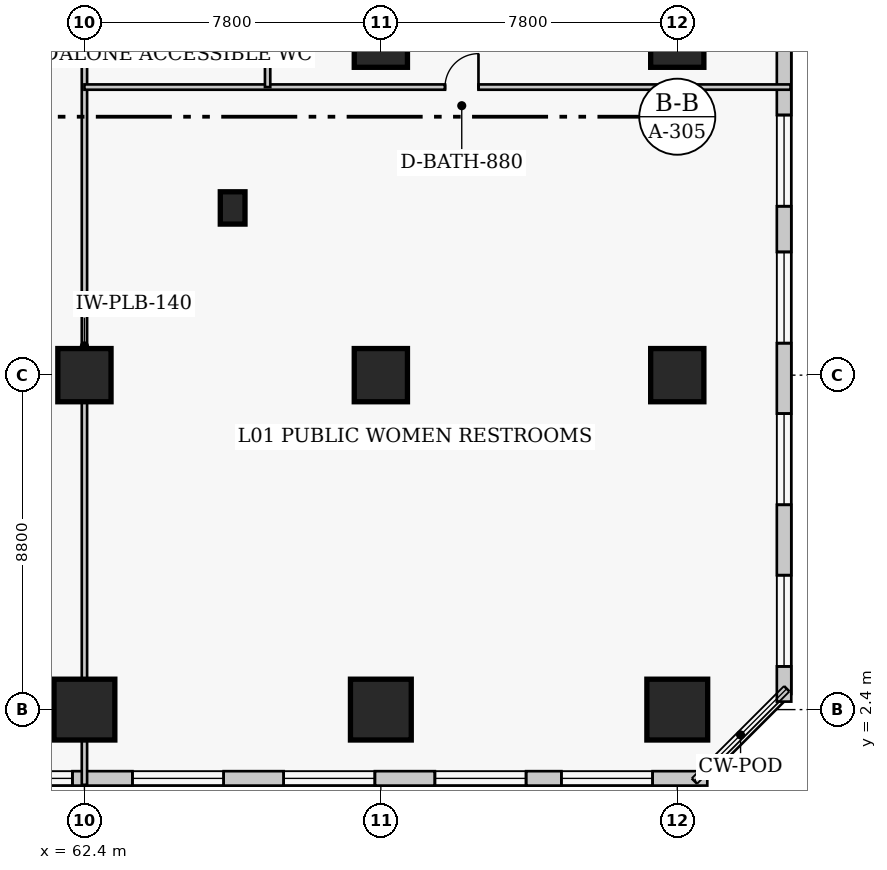
"""IFC4 building model, lengths in metres.
Left out: names, types, materials, properties, quantities, classifications, styles, units other than length and angle.
Written with IfcOpenShell. Run it as: python <this file> out.ifc"""

import sys

from ifc_helpers import new_model, si_unit, direction, frame, frame_2d, origin, origin_2d, place, context, subcontext, project, spatial, rectangle, extrude, element, fill, save


model = new_model("IFC4")
c1 = context("Model", 3, precision=1e-05, world=origin(), true_north=direction((0.0, 1.0)))
c2 = subcontext(c1, "Body", "Model", "MODEL_VIEW")
j1 = project(units=[si_unit("LENGTHUNIT", "METRE"), si_unit("PLANEANGLEUNIT", "RADIAN")], contexts=[c1])
p1 = place(None, origin())
s1 = spatial("IfcSite", under=j1, at=p1, CompositionType="ELEMENT")
p2 = place(p1, origin())
s2 = spatial("IfcBuilding", under=s1, at=p2, CompositionType="ELEMENT")
p3 = place(p2, frame((0.0, 0.0, 5.4)))
s3 = spatial("IfcBuildingStorey", under=s2, at=p3, CompositionType="ELEMENT", Elevation=5.4)
p4 = place(p3, frame((62.4, 2.4, 0.0), z_axis=(0.0, 0.0, 1.0), x_axis=(1.0, 0.0, 0.0)))
e1 = element("IfcColumn", 1, at=p4, inside=s3, PredefinedType="COLUMN", context=c2, shape_type="SweptSolid", body=[
    extrude(rectangle(XDim=1.6, YDim=1.6, at=origin_2d()), origin(), (0.0, 0.0, 1.0), 5.0),
])
p5 = place(p3, frame((62.4, 11.2, 0.0), z_axis=(0.0, 0.0, 1.0), x_axis=(1.0, 0.0, 0.0)))
e2 = element("IfcColumn", 2, at=p5, inside=s3, PredefinedType="COLUMN", context=c2, shape_type="SweptSolid", body=[
    extrude(rectangle(XDim=1.4, YDim=1.4, at=origin_2d()), origin(), (0.0, 0.0, 1.0), 5.0),
])
p6 = place(p3, frame((70.2, 2.4, 0.0), z_axis=(0.0, 0.0, 1.0), x_axis=(1.0, 0.0, 0.0)))
e3 = element("IfcColumn", 3, at=p6, inside=s3, PredefinedType="COLUMN", context=c2, shape_type="SweptSolid", body=[
    extrude(rectangle(XDim=1.6, YDim=1.6, at=origin_2d()), origin(), (0.0, 0.0, 1.0), 5.0),
])
for number, where, z_axis, x_axis in (
    (4, (70.2, 11.2, 0.0), (0.0, 0.0, 1.0), (1.0, 0.0, 0.0)),
    (5, (70.2, 20.0, 0.0), (0.0, 0.0, 1.0), (1.0, 0.0, 0.0)),
):
    element("IfcColumn", number, at=place(p3, frame(where, z_axis=z_axis, x_axis=x_axis)), inside=s3, PredefinedType="COLUMN", context=c2, shape_type="SweptSolid", body=[
        extrude(rectangle(XDim=1.4, YDim=1.4, at=origin_2d()), origin(), (0.0, 0.0, 1.0), 5.0),
    ])
p7 = place(p3, frame((78.0, 2.4, 0.0), z_axis=(0.0, 0.0, 1.0), x_axis=(1.0, 0.0, 0.0)))
e6 = element("IfcColumn", 6, at=p7, inside=s3, PredefinedType="COLUMN", context=c2, shape_type="SweptSolid", body=[
    extrude(rectangle(XDim=1.6, YDim=1.6, at=origin_2d()), origin(), (0.0, 0.0, 1.0), 5.0),
])
for number, where, z_axis, x_axis in (
    (7, (78.0, 11.2, 0.0), (0.0, 0.0, 1.0), (1.0, 0.0, 0.0)),
    (8, (78.0, 20.0, 0.0), (0.0, 0.0, 1.0), (1.0, 0.0, 0.0)),
):
    element("IfcColumn", number, at=place(p3, frame(where, z_axis=z_axis, x_axis=x_axis)), inside=s3, PredefinedType="COLUMN", context=c2, shape_type="SweptSolid", body=[
        extrude(rectangle(XDim=1.4, YDim=1.4, at=origin_2d()), origin(), (0.0, 0.0, 1.0), 5.0),
    ])
p8 = place(p3, frame((66.3, 15.6, 0.0), z_axis=(0.0, 0.0, 1.0), x_axis=(1.0, 0.0, 0.0)))
e9 = element("IfcColumn", 9, at=p8, inside=s3, PredefinedType="PILASTER", context=c2, shape_type="SweptSolid", body=[
    extrude(rectangle(XDim=0.65, YDim=0.85, at=origin_2d()), origin(), (0.0, 0.0, 1.0), 5.0),
])
p9 = place(p3, frame((-0.79, 0.59, 0.0), z_axis=(0.0, 0.0, 1.0), x_axis=(1.0, 0.0, 0.0)))
e10 = element("IfcWall", 10, at=p9, inside=s3, PredefinedType="SOLIDWALL", context=c2, shape_type="SweptSolid", body=[
    extrude(rectangle(XDim=79.58, YDim=0.38, at=frame_2d((39.79, 0.0))), origin(), (0.0, 0.0, 1.0), 4.65),
])
p10 = place(p9, frame((1.439, 0.0, 0.75)))
e11 = element("IfcOpeningElement", 11, at=p10, cuts=e10, PredefinedType="OPENING", context=c2, shape_type="SweptSolid", body=[
    extrude(rectangle(XDim=2.4, YDim=2.2, at=frame_2d((1.2, 1.1))), frame((0.0, 0.2, 0.0), z_axis=(0.0, -1.0, 0.0), x_axis=(1.0, 0.0, 0.0)), (0.0, 0.0, 1.0), 0.4),
])
p11 = place(p9, frame((4.769, 0.0, 0.75)))
e12 = element("IfcOpeningElement", 12, at=p11, cuts=e10, PredefinedType="OPENING", context=c2, shape_type="SweptSolid", body=[
    extrude(rectangle(XDim=2.4, YDim=2.2, at=frame_2d((1.2, 1.1))), frame((0.0, 0.2, 0.0), z_axis=(0.0, -1.0, 0.0), x_axis=(1.0, 0.0, 0.0)), (0.0, 0.0, 1.0), 0.4),
])
p12 = place(p9, frame((16.706, 0.0, 0.75)))
e13 = element("IfcOpeningElement", 13, at=p12, cuts=e10, PredefinedType="OPENING", context=c2, shape_type="SweptSolid", body=[
    extrude(rectangle(XDim=2.4, YDim=2.2, at=frame_2d((1.2, 1.1))), frame((0.0, 0.2, 0.0), z_axis=(0.0, -1.0, 0.0), x_axis=(1.0, 0.0, 0.0)), (0.0, 0.0, 1.0), 0.4),
])
p13 = place(p9, frame((20.685, 0.0, 0.75)))
e14 = element("IfcOpeningElement", 14, at=p13, cuts=e10, PredefinedType="OPENING", context=c2, shape_type="SweptSolid", body=[
    extrude(rectangle(XDim=2.4, YDim=2.2, at=frame_2d((1.2, 1.1))), frame((0.0, 0.2, 0.0), z_axis=(0.0, -1.0, 0.0), x_axis=(1.0, 0.0, 0.0)), (0.0, 0.0, 1.0), 0.4),
])
p14 = place(p9, frame((24.664, 0.0, 0.75)))
e15 = element("IfcOpeningElement", 15, at=p14, cuts=e10, PredefinedType="OPENING", context=c2, shape_type="SweptSolid", body=[
    extrude(rectangle(XDim=2.4, YDim=2.2, at=frame_2d((1.2, 1.1))), frame((0.0, 0.2, 0.0), z_axis=(0.0, -1.0, 0.0), x_axis=(1.0, 0.0, 0.0)), (0.0, 0.0, 1.0), 0.4),
])
p15 = place(p9, frame((28.643, 0.0, 0.75)))
e16 = element("IfcOpeningElement", 16, at=p15, cuts=e10, PredefinedType="OPENING", context=c2, shape_type="SweptSolid", body=[
    extrude(rectangle(XDim=2.4, YDim=2.2, at=frame_2d((1.2, 1.1))), frame((0.0, 0.2, 0.0), z_axis=(0.0, -1.0, 0.0), x_axis=(1.0, 0.0, 0.0)), (0.0, 0.0, 1.0), 0.4),
])
p16 = place(p9, frame((31.971, 0.0, 0.75)))
e17 = element("IfcOpeningElement", 17, at=p16, cuts=e10, PredefinedType="OPENING", context=c2, shape_type="SweptSolid", body=[
    extrude(rectangle(XDim=2.4, YDim=2.2, at=frame_2d((1.2, 1.1))), frame((0.0, 0.2, 0.0), z_axis=(0.0, -1.0, 0.0), x_axis=(1.0, 0.0, 0.0)), (0.0, 0.0, 1.0), 0.4),
])
p17 = place(p9, frame((37.75, 0.0, 0.75)))
e18 = element("IfcOpeningElement", 18, at=p17, cuts=e10, PredefinedType="OPENING", context=c2, shape_type="SweptSolid", body=[
    extrude(rectangle(XDim=2.4, YDim=2.2, at=frame_2d((1.2, 1.1))), frame((0.0, 0.2, 0.0), z_axis=(0.0, -1.0, 0.0), x_axis=(1.0, 0.0, 0.0)), (0.0, 0.0, 1.0), 0.4),
])
p18 = place(p9, frame((44.559, 0.0, 0.75)))
e19 = element("IfcOpeningElement", 19, at=p18, cuts=e10, PredefinedType="OPENING", context=c2, shape_type="SweptSolid", body=[
    extrude(rectangle(XDim=2.4, YDim=2.2, at=frame_2d((1.2, 1.1))), frame((0.0, 0.2, 0.0), z_axis=(0.0, -1.0, 0.0), x_axis=(1.0, 0.0, 0.0)), (0.0, 0.0, 1.0), 0.4),
])
p19 = place(p9, frame((49.188, 0.0, 0.75)))
e20 = element("IfcOpeningElement", 20, at=p19, cuts=e10, PredefinedType="OPENING", context=c2, shape_type="SweptSolid", body=[
    extrude(rectangle(XDim=2.4, YDim=2.2, at=frame_2d((1.2, 1.1))), frame((0.0, 0.2, 0.0), z_axis=(0.0, -1.0, 0.0), x_axis=(1.0, 0.0, 0.0)), (0.0, 0.0, 1.0), 0.4),
])
p20 = place(p9, frame((52.517, 0.0, 0.75)))
e21 = element("IfcOpeningElement", 21, at=p20, cuts=e10, PredefinedType="OPENING", context=c2, shape_type="SweptSolid", body=[
    extrude(rectangle(XDim=2.4, YDim=2.2, at=frame_2d((1.2, 1.1))), frame((0.0, 0.2, 0.0), z_axis=(0.0, -1.0, 0.0), x_axis=(1.0, 0.0, 0.0)), (0.0, 0.0, 1.0), 0.4),
])
p21 = place(p9, frame((56.496, 0.0, 0.75)))
e22 = element("IfcOpeningElement", 22, at=p21, cuts=e10, PredefinedType="OPENING", context=c2, shape_type="SweptSolid", body=[
    extrude(rectangle(XDim=2.4, YDim=2.2, at=frame_2d((1.2, 1.1))), frame((0.0, 0.2, 0.0), z_axis=(0.0, -1.0, 0.0), x_axis=(1.0, 0.0, 0.0)), (0.0, 0.0, 1.0), 0.4),
])
p22 = place(p9, frame((60.475, 0.0, 0.75)))
e23 = element("IfcOpeningElement", 23, at=p22, cuts=e10, PredefinedType="OPENING", context=c2, shape_type="SweptSolid", body=[
    extrude(rectangle(XDim=2.4, YDim=2.2, at=frame_2d((1.2, 1.1))), frame((0.0, 0.2, 0.0), z_axis=(0.0, -1.0, 0.0), x_axis=(1.0, 0.0, 0.0)), (0.0, 0.0, 1.0), 0.4),
])
p23 = place(p9, frame((64.454, 0.0, 0.75)))
e24 = element("IfcOpeningElement", 24, at=p23, cuts=e10, PredefinedType="OPENING", context=c2, shape_type="SweptSolid", body=[
    extrude(rectangle(XDim=2.4, YDim=2.2, at=frame_2d((1.2, 1.1))), frame((0.0, 0.2, 0.0), z_axis=(0.0, -1.0, 0.0), x_axis=(1.0, 0.0, 0.0)), (0.0, 0.0, 1.0), 0.4),
])
p24 = place(p9, frame((68.433, 0.0, 0.75)))
e25 = element("IfcOpeningElement", 25, at=p24, cuts=e10, PredefinedType="OPENING", context=c2, shape_type="SweptSolid", body=[
    extrude(rectangle(XDim=2.4, YDim=2.2, at=frame_2d((1.2, 1.1))), frame((0.0, 0.2, 0.0), z_axis=(0.0, -1.0, 0.0), x_axis=(1.0, 0.0, 0.0)), (0.0, 0.0, 1.0), 0.4),
])
p25 = place(p9, frame((72.412, 0.0, 0.75)))
e26 = element("IfcOpeningElement", 26, at=p25, cuts=e10, PredefinedType="OPENING", context=c2, shape_type="SweptSolid", body=[
    extrude(rectangle(XDim=2.4, YDim=2.2, at=frame_2d((1.2, 1.1))), frame((0.0, 0.2, 0.0), z_axis=(0.0, -1.0, 0.0), x_axis=(1.0, 0.0, 0.0)), (0.0, 0.0, 1.0), 0.4),
])
p26 = place(p9, frame((75.74, 0.0, 0.75)))
e27 = element("IfcOpeningElement", 27, at=p26, cuts=e10, PredefinedType="OPENING", context=c2, shape_type="SweptSolid", body=[
    extrude(rectangle(XDim=2.4, YDim=2.2, at=frame_2d((1.2, 1.1))), frame((0.0, 0.2, 0.0), z_axis=(0.0, -1.0, 0.0), x_axis=(1.0, 0.0, 0.0)), (0.0, 0.0, 1.0), 0.4),
])
p27 = place(p3, frame((80.81, 2.61, 0.0), z_axis=(0.0, 0.0, 1.0), x_axis=(0.0, 1.0, 0.0)))
e28 = element("IfcWall", 28, at=p27, inside=s3, PredefinedType="SOLIDWALL", context=c2, shape_type="SweptSolid", body=[
    extrude(rectangle(XDim=46.78, YDim=0.38, at=frame_2d((23.39, 0.0))), origin(), (0.0, 0.0, 1.0), 4.65),
])
p28 = place(p27, frame((0.927, 0.0, 0.75)))
e29 = element("IfcOpeningElement", 29, at=p28, cuts=e28, PredefinedType="OPENING", context=c2, shape_type="SweptSolid", body=[
    extrude(rectangle(XDim=2.4, YDim=2.2, at=frame_2d((1.2, 1.1))), frame((0.0, 0.2, 0.0), z_axis=(0.0, -1.0, 0.0), x_axis=(1.0, 0.0, 0.0)), (0.0, 0.0, 1.0), 0.4),
])
p29 = place(p27, frame((5.179, 0.0, 0.75)))
e30 = element("IfcOpeningElement", 30, at=p29, cuts=e28, PredefinedType="OPENING", context=c2, shape_type="SweptSolid", body=[
    extrude(rectangle(XDim=2.4, YDim=2.2, at=frame_2d((1.2, 1.1))), frame((0.0, 0.2, 0.0), z_axis=(0.0, -1.0, 0.0), x_axis=(1.0, 0.0, 0.0)), (0.0, 0.0, 1.0), 0.4),
])
p30 = place(p27, frame((9.432, 0.0, 0.75)))
e31 = element("IfcOpeningElement", 31, at=p30, cuts=e28, PredefinedType="OPENING", context=c2, shape_type="SweptSolid", body=[
    extrude(rectangle(XDim=2.4, YDim=2.2, at=frame_2d((1.2, 1.1))), frame((0.0, 0.2, 0.0), z_axis=(0.0, -1.0, 0.0), x_axis=(1.0, 0.0, 0.0)), (0.0, 0.0, 1.0), 0.4),
])
p31 = place(p27, frame((13.034, 0.0, 0.75)))
e32 = element("IfcOpeningElement", 32, at=p31, cuts=e28, PredefinedType="OPENING", context=c2, shape_type="SweptSolid", body=[
    extrude(rectangle(XDim=2.4, YDim=2.2, at=frame_2d((1.2, 1.1))), frame((0.0, 0.2, 0.0), z_axis=(0.0, -1.0, 0.0), x_axis=(1.0, 0.0, 0.0)), (0.0, 0.0, 1.0), 0.4),
])
p32 = place(p27, frame((17.937, 0.0, 0.75)))
e33 = element("IfcOpeningElement", 33, at=p32, cuts=e28, PredefinedType="OPENING", context=c2, shape_type="SweptSolid", body=[
    extrude(rectangle(XDim=2.4, YDim=2.2, at=frame_2d((1.2, 1.1))), frame((0.0, 0.2, 0.0), z_axis=(0.0, -1.0, 0.0), x_axis=(1.0, 0.0, 0.0)), (0.0, 0.0, 1.0), 0.4),
])
p33 = place(p27, frame((26.443, 0.0, 0.75)))
e34 = element("IfcOpeningElement", 34, at=p33, cuts=e28, PredefinedType="OPENING", context=c2, shape_type="SweptSolid", body=[
    extrude(rectangle(XDim=2.4, YDim=2.2, at=frame_2d((1.2, 1.1))), frame((0.0, 0.2, 0.0), z_axis=(0.0, -1.0, 0.0), x_axis=(1.0, 0.0, 0.0)), (0.0, 0.0, 1.0), 0.4),
])
p34 = place(p27, frame((30.696, 0.0, 0.75)))
e35 = element("IfcOpeningElement", 35, at=p34, cuts=e28, PredefinedType="OPENING", context=c2, shape_type="SweptSolid", body=[
    extrude(rectangle(XDim=2.4, YDim=2.2, at=frame_2d((1.2, 1.1))), frame((0.0, 0.2, 0.0), z_axis=(0.0, -1.0, 0.0), x_axis=(1.0, 0.0, 0.0)), (0.0, 0.0, 1.0), 0.4),
])
p35 = place(p27, frame((34.948, 0.0, 0.75)))
e36 = element("IfcOpeningElement", 36, at=p35, cuts=e28, PredefinedType="OPENING", context=c2, shape_type="SweptSolid", body=[
    extrude(rectangle(XDim=2.4, YDim=2.2, at=frame_2d((1.2, 1.1))), frame((0.0, 0.2, 0.0), z_axis=(0.0, -1.0, 0.0), x_axis=(1.0, 0.0, 0.0)), (0.0, 0.0, 1.0), 0.4),
])
p36 = place(p27, frame((39.201, 0.0, 0.75)))
e37 = element("IfcOpeningElement", 37, at=p36, cuts=e28, PredefinedType="OPENING", context=c2, shape_type="SweptSolid", body=[
    extrude(rectangle(XDim=2.4, YDim=2.2, at=frame_2d((1.2, 1.1))), frame((0.0, 0.2, 0.0), z_axis=(0.0, -1.0, 0.0), x_axis=(1.0, 0.0, 0.0)), (0.0, 0.0, 1.0), 0.4),
])
p37 = place(p27, frame((43.454, 0.0, 0.75)))
e38 = element("IfcOpeningElement", 38, at=p37, cuts=e28, PredefinedType="OPENING", context=c2, shape_type="SweptSolid", body=[
    extrude(rectangle(XDim=2.4, YDim=2.2, at=frame_2d((1.2, 1.1))), frame((0.0, 0.2, 0.0), z_axis=(0.0, -1.0, 0.0), x_axis=(1.0, 0.0, 0.0)), (0.0, 0.0, 1.0), 0.4),
])
p38 = place(p3, frame((62.4, 0.42, 0.0), z_axis=(0.0, 0.0, 1.0), x_axis=(0.0, 1.0, 0.0)))
e39 = element("IfcWall", 39, at=p38, inside=s3, PredefinedType="PLUMBINGWALL", context=c2, shape_type="SweptSolid", body=[
    extrude(rectangle(XDim=23.1, YDim=0.14, at=frame_2d((11.55, 0.0))), origin(), (0.0, 0.0, 1.0), 3.9),
])
p39 = place(p3, frame((62.4, 18.78, 0.0), z_axis=(0.0, 0.0, 1.0), x_axis=(1.0, 0.0, 0.0)))
e40 = element("IfcWall", 40, at=p39, inside=s3, PredefinedType="PLUMBINGWALL", context=c2, shape_type="SweptSolid", body=[
    extrude(rectangle(XDim=18.58, YDim=0.14, at=frame_2d((9.29, 0.0))), origin(), (0.0, 0.0, 1.0), 4.65),
])
p40 = place(p39, frame((9.489, 0.0, 0.0)))
e41 = element("IfcOpeningElement", 41, at=p40, cuts=e40, PredefinedType="OPENING", context=c2, shape_type="SweptSolid", body=[
    extrude(rectangle(XDim=0.88, YDim=2.05, at=frame_2d((0.44, 1.025))), frame((0.0, 0.08, 0.0), z_axis=(0.0, -1.0, 0.0), x_axis=(1.0, 0.0, 0.0)), (0.0, 0.0, 1.0), 0.16),
])
p41 = place(p3, frame((67.22, 18.78, 0.0), z_axis=(0.0, 0.0, 1.0), x_axis=(0.0, 1.0, 0.0)))
e42 = element("IfcWall", 42, at=p41, inside=s3, PredefinedType="PLUMBINGWALL", context=c2, shape_type="SweptSolid", body=[
    extrude(rectangle(XDim=4.74, YDim=0.14, at=frame_2d((2.37, 0.0))), origin(), (0.0, 0.0, 1.0), 4.65),
])
p42 = place(p22, origin())
e43 = element("IfcWindow", 43, at=p42, inside=s3, PartitioningType="SINGLE_PANEL", PredefinedType="WINDOW", context=c2, shape_type="SweptSolid", body=[
    extrude(rectangle(XDim=2.4, YDim=2.2, at=frame_2d((1.2, 1.1))), frame((0.0, 0.03, 0.0), z_axis=(0.0, -1.0, 0.0), x_axis=(1.0, 0.0, 0.0)), (0.0, 0.0, 1.0), 0.06),
])
fill(e23, e43)
p43 = place(p23, origin())
e44 = element("IfcWindow", 44, at=p43, inside=s3, PartitioningType="SINGLE_PANEL", PredefinedType="WINDOW", context=c2, shape_type="SweptSolid", body=[
    extrude(rectangle(XDim=2.4, YDim=2.2, at=frame_2d((1.2, 1.1))), frame((0.0, 0.03, 0.0), z_axis=(0.0, -1.0, 0.0), x_axis=(1.0, 0.0, 0.0)), (0.0, 0.0, 1.0), 0.06),
])
fill(e24, e44)
p44 = place(p24, origin())
e45 = element("IfcWindow", 45, at=p44, inside=s3, PartitioningType="SINGLE_PANEL", PredefinedType="WINDOW", context=c2, shape_type="SweptSolid", body=[
    extrude(rectangle(XDim=2.4, YDim=2.2, at=frame_2d((1.2, 1.1))), frame((0.0, 0.03, 0.0), z_axis=(0.0, -1.0, 0.0), x_axis=(1.0, 0.0, 0.0)), (0.0, 0.0, 1.0), 0.06),
])
fill(e25, e45)
p45 = place(p25, origin())
e46 = element("IfcWindow", 46, at=p45, inside=s3, PartitioningType="SINGLE_PANEL", PredefinedType="WINDOW", context=c2, shape_type="SweptSolid", body=[
    extrude(rectangle(XDim=2.4, YDim=2.2, at=frame_2d((1.2, 1.1))), frame((0.0, 0.03, 0.0), z_axis=(0.0, -1.0, 0.0), x_axis=(1.0, 0.0, 0.0)), (0.0, 0.0, 1.0), 0.06),
])
fill(e26, e46)
p46 = place(p26, origin())
e47 = element("IfcWindow", 47, at=p46, inside=s3, PartitioningType="SINGLE_PANEL", PredefinedType="WINDOW", context=c2, shape_type="SweptSolid", body=[
    extrude(rectangle(XDim=2.4, YDim=2.2, at=frame_2d((1.2, 1.1))), frame((0.0, 0.03, 0.0), z_axis=(0.0, -1.0, 0.0), x_axis=(1.0, 0.0, 0.0)), (0.0, 0.0, 1.0), 0.06),
])
fill(e27, e47)
p47 = place(p28, origin())
e48 = element("IfcWindow", 48, at=p47, inside=s3, PartitioningType="SINGLE_PANEL", PredefinedType="WINDOW", context=c2, shape_type="SweptSolid", body=[
    extrude(rectangle(XDim=2.4, YDim=2.2, at=frame_2d((1.2, 1.1))), frame((0.0, 0.03, 0.0), z_axis=(0.0, -1.0, 0.0), x_axis=(1.0, 0.0, 0.0)), (0.0, 0.0, 1.0), 0.06),
])
fill(e29, e48)
p48 = place(p29, origin())
e49 = element("IfcWindow", 49, at=p48, inside=s3, PartitioningType="SINGLE_PANEL", PredefinedType="WINDOW", context=c2, shape_type="SweptSolid", body=[
    extrude(rectangle(XDim=2.4, YDim=2.2, at=frame_2d((1.2, 1.1))), frame((0.0, 0.03, 0.0), z_axis=(0.0, -1.0, 0.0), x_axis=(1.0, 0.0, 0.0)), (0.0, 0.0, 1.0), 0.06),
])
fill(e30, e49)
p49 = place(p30, origin())
e50 = element("IfcWindow", 50, at=p49, inside=s3, PartitioningType="SINGLE_PANEL", PredefinedType="WINDOW", context=c2, shape_type="SweptSolid", body=[
    extrude(rectangle(XDim=2.4, YDim=2.2, at=frame_2d((1.2, 1.1))), frame((0.0, 0.03, 0.0), z_axis=(0.0, -1.0, 0.0), x_axis=(1.0, 0.0, 0.0)), (0.0, 0.0, 1.0), 0.06),
])
fill(e31, e50)
p50 = place(p31, origin())
e51 = element("IfcWindow", 51, at=p50, inside=s3, PartitioningType="SINGLE_PANEL", PredefinedType="WINDOW", context=c2, shape_type="SweptSolid", body=[
    extrude(rectangle(XDim=2.4, YDim=2.2, at=frame_2d((1.2, 1.1))), frame((0.0, 0.03, 0.0), z_axis=(0.0, -1.0, 0.0), x_axis=(1.0, 0.0, 0.0)), (0.0, 0.0, 1.0), 0.06),
])
fill(e32, e51)
p51 = place(p40, origin())
e52 = element("IfcDoor", 52, at=p51, inside=s3, OperationType="SINGLE_SWING_RIGHT", PredefinedType="DOOR", context=c2, shape_type="SweptSolid", body=[
    extrude(rectangle(XDim=0.88, YDim=2.05, at=frame_2d((0.44, 1.025))), frame((0.0, 0.025, 0.0), z_axis=(0.0, -1.0, 0.0), x_axis=(1.0, 0.0, 0.0)), (0.0, 0.0, 1.0), 0.05),
])
fill(e41, e52)
save(model, sys.argv[1])
